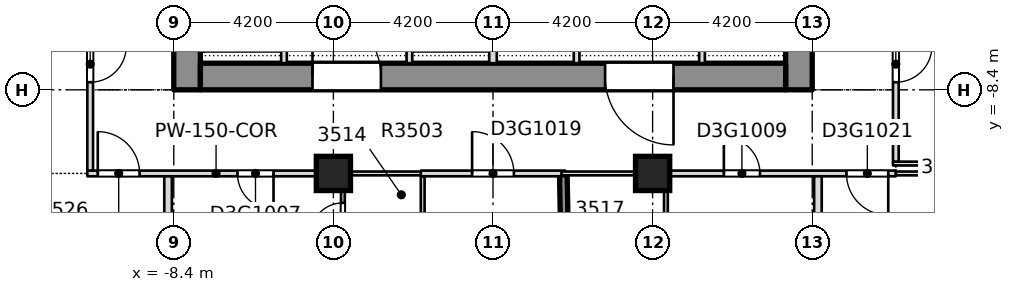
"""IFC4 building model, lengths in metres.
Left out: names, types, materials, properties, quantities, classifications, styles, units other than length and angle.
Written with IfcOpenShell. Run it as: python <this file> out.ifc"""

import sys

from ifc_helpers import new_model, si_unit, direction, frame, frame_2d, origin, origin_2d, place, context, subcontext, project, spatial, rectangle, extrude, element, fill, save


model = new_model("IFC4")
c1 = context("Model", 3, precision=1e-05, world=origin(), true_north=direction((0.0, 1.0)))
c2 = subcontext(c1, "Body", "Model", "MODEL_VIEW")
j1 = project(units=[si_unit("LENGTHUNIT", "METRE"), si_unit("PLANEANGLEUNIT", "RADIAN")], contexts=[c1])
p1 = place(None, origin())
s1 = spatial("IfcSite", under=j1, at=p1, CompositionType="ELEMENT")
p2 = place(p1, origin())
s2 = spatial("IfcBuilding", under=s1, at=p2, CompositionType="ELEMENT")
p3 = place(p2, frame((0.0, 0.0, 140.0)))
s3 = spatial("IfcBuildingStorey", under=s2, at=p3, CompositionType="ELEMENT", Elevation=140.0)
p4 = place(p3, frame((8.05, -8.4, -0.4), z_axis=(0.0, 0.0, 1.0), x_axis=(0.0, 1.0, 0.0)))
e1 = element("IfcWall", 1, at=p4, inside=s3, PredefinedType="SOLIDWALL", context=c2, shape_type="SweptSolid", body=[
    extrude(rectangle(XDim=30.15, YDim=0.7, at=frame_2d((15.075, 0.0))), origin(), (0.0, 0.0, 1.0), 3.45),
])
p5 = place(p4, frame((19.3, 0.0, 0.4)))
e2 = element("IfcOpeningElement", 2, at=p5, cuts=e1, PredefinedType="OPENING", context=c2, shape_type="SweptSolid", body=[
    extrude(rectangle(XDim=1.2, YDim=2.1, at=frame_2d((0.6, 1.05))), frame((0.0, 0.36, 0.0), z_axis=(0.0, -1.0, 0.0), x_axis=(1.0, 0.0, 0.0)), (0.0, 0.0, 1.0), 0.72),
])
p6 = place(p3, frame((-8.05, -8.4, -0.4), z_axis=(0.0, 0.0, 1.0), x_axis=(0.0, 1.0, 0.0)))
e3 = element("IfcWall", 3, at=p6, inside=s3, PredefinedType="SOLIDWALL", context=c2, shape_type="SweptSolid", body=[
    extrude(rectangle(XDim=30.15, YDim=0.7, at=frame_2d((15.075, 0.0))), origin(), (0.0, 0.0, 1.0), 3.45),
])
p7 = place(p6, frame((19.3, 0.0, 0.4)))
e4 = element("IfcOpeningElement", 4, at=p7, cuts=e3, PredefinedType="OPENING", context=c2, shape_type="SweptSolid", body=[
    extrude(rectangle(XDim=1.2, YDim=2.1, at=frame_2d((0.6, 1.05))), frame((0.0, 0.36, 0.0), z_axis=(0.0, -1.0, 0.0), x_axis=(1.0, 0.0, 0.0)), (0.0, 0.0, 1.0), 0.72),
])
p8 = place(p3, frame((-7.7, -8.05, -0.4), z_axis=(0.0, 0.0, 1.0), x_axis=(1.0, 0.0, 0.0)))
e5 = element("IfcWall", 5, at=p8, inside=s3, PredefinedType="SHEAR", context=c2, shape_type="SweptSolid", body=[
    extrude(rectangle(XDim=15.4, YDim=0.7, at=frame_2d((7.7, 0.0))), origin(), (0.0, 0.0, 1.0), 3.45),
])
p9 = place(p8, frame((2.95, 0.0, 0.4)))
e6 = element("IfcOpeningElement", 6, at=p9, cuts=e5, PredefinedType="OPENING", context=c2, shape_type="SweptSolid", body=[
    extrude(rectangle(XDim=1.8, YDim=2.1, at=frame_2d((0.9, 1.05))), frame((0.0, 0.36, 0.0), z_axis=(0.0, -1.0, 0.0), x_axis=(1.0, 0.0, 0.0)), (0.0, 0.0, 1.0), 0.72),
])
p10 = place(p8, frame((10.65, 0.0, 0.4)))
e7 = element("IfcOpeningElement", 7, at=p10, cuts=e5, PredefinedType="OPENING", context=c2, shape_type="SweptSolid", body=[
    extrude(rectangle(XDim=1.8, YDim=2.1, at=frame_2d((0.9, 1.05))), frame((0.0, 0.36, 0.0), z_axis=(0.0, -1.0, 0.0), x_axis=(1.0, 0.0, 0.0)), (0.0, 0.0, 1.0), 0.72),
])
for number, where, z_axis, x_axis in (
    (8, (-4.2, -10.6, -0.4), (0.0, 0.0, 1.0), (1.0, 0.0, 0.0)),
    (9, (4.2, -10.6, -0.4), (0.0, 0.0, 1.0), (1.0, 0.0, 0.0)),
):
    element("IfcColumn", number, at=place(p3, frame(where, z_axis=z_axis, x_axis=x_axis)), inside=s3, PredefinedType="COLUMN", context=c2, shape_type="SweptSolid", body=[
        extrude(rectangle(XDim=0.9, YDim=0.9, at=origin_2d()), origin(), (0.0, 0.0, 1.0), 3.45),
    ])
p11 = place(p3, frame((-10.675, -10.6, 0.0), z_axis=(0.0, 0.0, 1.0), x_axis=(1.0, 0.0, 0.0)))
e10 = element("IfcWall", 10, at=p11, inside=s3, PredefinedType="PARTITIONING", context=c2, shape_type="SweptSolid", body=[
    extrude(rectangle(XDim=6.775, YDim=0.15, at=frame_2d((3.388, 0.0))), origin(), (0.0, 0.0, 1.0), 3.05),
])
p12 = place(p11, frame((3.95, 0.0, 0.0)))
e11 = element("IfcOpeningElement", 11, at=p12, cuts=e10, PredefinedType="OPENING", context=c2, shape_type="SweptSolid", body=[
    extrude(rectangle(XDim=0.95, YDim=2.1, at=frame_2d((0.475, 1.05))), frame((0.0, 0.085, 0.0), z_axis=(0.0, -1.0, 0.0), x_axis=(1.0, 0.0, 0.0)), (0.0, 0.0, 1.0), 0.17),
])
p13 = place(p11, frame((0.275, 0.0, 0.0)))
e12 = element("IfcOpeningElement", 12, at=p13, cuts=e10, PredefinedType="OPENING", context=c2, shape_type="SweptSolid", body=[
    extrude(rectangle(XDim=1.1, YDim=2.1, at=frame_2d((0.55, 1.05))), frame((0.0, 0.085, 0.0), z_axis=(0.0, -1.0, 0.0), x_axis=(1.0, 0.0, 0.0)), (0.0, 0.0, 1.0), 0.17),
])
p14 = place(p3, frame((-4.0, -10.6, 0.0), z_axis=(0.0, 0.0, 1.0), x_axis=(1.0, 0.0, 0.0)))
e13 = element("IfcWall", 13, at=p14, inside=s3, PredefinedType="PARTITIONING", context=c2, shape_type="SweptSolid", body=[
    extrude(rectangle(XDim=2.2, YDim=0.1, at=frame_2d((1.1, 0.0))), origin(), (0.0, 0.0, 1.0), 3.05),
])
p15 = place(p3, frame((-1.9, -10.6, 0.0), z_axis=(0.0, 0.0, 1.0), x_axis=(1.0, 0.0, 0.0)))
e14 = element("IfcWall", 14, at=p15, inside=s3, PredefinedType="PARTITIONING", context=c2, shape_type="SweptSolid", body=[
    extrude(rectangle(XDim=3.8, YDim=0.15, at=frame_2d((1.9, 0.0))), origin(), (0.0, 0.0, 1.0), 3.05),
])
p16 = place(p15, frame((1.35, 0.0, 0.0)))
e15 = element("IfcOpeningElement", 15, at=p16, cuts=e14, PredefinedType="OPENING", context=c2, shape_type="SweptSolid", body=[
    extrude(rectangle(XDim=1.1, YDim=2.1, at=frame_2d((0.55, 1.05))), frame((0.0, 0.085, 0.0), z_axis=(0.0, -1.0, 0.0), x_axis=(1.0, 0.0, 0.0)), (0.0, 0.0, 1.0), 0.17),
])
p17 = place(p3, frame((1.8, -10.6, 0.0), z_axis=(0.0, 0.0, 1.0), x_axis=(1.0, 0.0, 0.0)))
e16 = element("IfcWall", 16, at=p17, inside=s3, PredefinedType="PARTITIONING", context=c2, shape_type="SweptSolid", body=[
    extrude(rectangle(XDim=2.8, YDim=0.1, at=frame_2d((1.4, 0.0))), origin(), (0.0, 0.0, 1.0), 3.05),
])
p18 = place(p3, frame((4.5, -10.6, 0.0), z_axis=(0.0, 0.0, 1.0), x_axis=(1.0, 0.0, 0.0)))
e17 = element("IfcWall", 17, at=p18, inside=s3, PredefinedType="PARTITIONING", context=c2, shape_type="SweptSolid", body=[
    extrude(rectangle(XDim=6.1, YDim=0.15, at=frame_2d((3.05, 0.0))), origin(), (0.0, 0.0, 1.0), 3.05),
])
p19 = place(p18, frame((1.575, 0.0, 0.0)))
e18 = element("IfcOpeningElement", 18, at=p19, cuts=e17, PredefinedType="OPENING", context=c2, shape_type="SweptSolid", body=[
    extrude(rectangle(XDim=0.95, YDim=2.1, at=frame_2d((0.475, 1.05))), frame((0.0, 0.085, 0.0), z_axis=(0.0, -1.0, 0.0), x_axis=(1.0, 0.0, 0.0)), (0.0, 0.0, 1.0), 0.17),
])
p20 = place(p18, frame((4.8, 0.0, 0.0)))
e19 = element("IfcOpeningElement", 19, at=p20, cuts=e17, PredefinedType="OPENING", context=c2, shape_type="SweptSolid", body=[
    extrude(rectangle(XDim=1.1, YDim=2.1, at=frame_2d((0.55, 1.05))), frame((0.0, 0.085, 0.0), z_axis=(0.0, -1.0, 0.0), x_axis=(1.0, 0.0, 0.0)), (0.0, 0.0, 1.0), 0.17),
])
p21 = place(p3, frame((10.6, -10.6, 0.0), z_axis=(0.0, 0.0, 1.0), x_axis=(1.0, 0.0, 0.0)))
e20 = element("IfcWall", 20, at=p21, inside=s3, PredefinedType="PARTITIONING", context=c2, shape_type="SweptSolid", body=[
    extrude(rectangle(XDim=1.7, YDim=0.1, at=frame_2d((0.85, 0.0))), origin(), (0.0, 0.0, 1.0), 3.05),
])
p22 = place(p3, frame((10.525, -10.34, 0.0), z_axis=(0.0, 0.0, 1.0), x_axis=(1.0, 0.0, 0.0)))
e21 = element("IfcWall", 21, at=p22, inside=s3, PredefinedType="PARTITIONING", context=c2, shape_type="SweptSolid", body=[
    extrude(rectangle(XDim=2.825, YDim=0.1, at=frame_2d((1.413, 0.0))), origin(), (0.0, 0.0, 1.0), 3.05),
])
p23 = place(p3, frame((-10.6, -10.525, 0.0), z_axis=(0.0, 0.0, 1.0), x_axis=(0.0, 1.0, 0.0)))
e22 = element("IfcWall", 22, at=p23, inside=s3, PredefinedType="PARTITIONING", context=c2, shape_type="SweptSolid", body=[
    extrude(rectangle(XDim=13.875, YDim=0.15, at=frame_2d((6.938, 0.0))), origin(), (0.0, 0.0, 1.0), 3.05),
])
p24 = place(p23, frame((2.325, 0.0, 0.0)))
e23 = element("IfcOpeningElement", 23, at=p24, cuts=e22, PredefinedType="OPENING", context=c2, shape_type="SweptSolid", body=[
    extrude(rectangle(XDim=0.95, YDim=2.1, at=frame_2d((0.475, 1.05))), frame((0.0, 0.085, 0.0), z_axis=(0.0, -1.0, 0.0), x_axis=(1.0, 0.0, 0.0)), (0.0, 0.0, 1.0), 0.17),
])
p25 = place(p23, frame((9.975, 0.0, 0.0)))
e24 = element("IfcOpeningElement", 24, at=p25, cuts=e22, PredefinedType="OPENING", context=c2, shape_type="SweptSolid", body=[
    extrude(rectangle(XDim=1.1, YDim=2.1, at=frame_2d((0.55, 1.05))), frame((0.0, 0.085, 0.0), z_axis=(0.0, -1.0, 0.0), x_axis=(1.0, 0.0, 0.0)), (0.0, 0.0, 1.0), 0.17),
])
p26 = place(p23, frame((4.825, 0.0, 0.0)))
e25 = element("IfcOpeningElement", 25, at=p26, cuts=e22, PredefinedType="OPENING", context=c2, shape_type="SweptSolid", body=[
    extrude(rectangle(XDim=1.0, YDim=2.1, at=frame_2d((0.5, 1.05))), frame((0.0, 0.085, 0.0), z_axis=(0.0, -1.0, 0.0), x_axis=(1.0, 0.0, 0.0)), (0.0, 0.0, 1.0), 0.17),
])
p27 = place(p23, frame((12.225, 0.0, 0.0)))
e26 = element("IfcOpeningElement", 26, at=p27, cuts=e22, PredefinedType="OPENING", context=c2, shape_type="SweptSolid", body=[
    extrude(rectangle(XDim=1.0, YDim=2.1, at=frame_2d((0.5, 1.05))), frame((0.0, 0.085, 0.0), z_axis=(0.0, -1.0, 0.0), x_axis=(1.0, 0.0, 0.0)), (0.0, 0.0, 1.0), 0.17),
])
p28 = place(p3, frame((-8.55, -13.1, 0.0), z_axis=(0.0, 0.0, 1.0), x_axis=(0.0, 1.0, 0.0)))
e27 = element("IfcWall", 27, at=p28, inside=s3, PredefinedType="PARTITIONING", context=c2, shape_type="SweptSolid", body=[
    extrude(rectangle(XDim=2.425, YDim=0.2, at=frame_2d((1.212, 0.0))), origin(), (0.0, 0.0, 1.0), 3.05),
])
p29 = place(p3, frame((-3.95, -12.95, 0.0), z_axis=(0.0, 0.0, 1.0), x_axis=(0.0, 1.0, 0.0)))
e28 = element("IfcWall", 28, at=p29, inside=s3, PredefinedType="PARTITIONING", context=c2, shape_type="SweptSolid", body=[
    extrude(rectangle(XDim=2.275, YDim=0.1, at=frame_2d((1.137, 0.0))), origin(), (0.0, 0.0, 1.0), 3.05),
])
p30 = place(p29, frame((0.725, 0.0, 0.0)))
e29 = element("IfcOpeningElement", 29, at=p30, cuts=e28, PredefinedType="OPENING", context=c2, shape_type="SweptSolid", body=[
    extrude(rectangle(XDim=0.85, YDim=2.1, at=frame_2d((0.425, 1.05))), frame((0.0, 0.06, 0.0), z_axis=(0.0, -1.0, 0.0), x_axis=(1.0, 0.0, 0.0)), (0.0, 0.0, 1.0), 0.12),
])
p31 = place(p3, frame((-1.85, -12.95, 0.0), z_axis=(0.0, 0.0, 1.0), x_axis=(0.0, 1.0, 0.0)))
e30 = element("IfcWall", 30, at=p31, inside=s3, PredefinedType="PARTITIONING", context=c2, shape_type="SweptSolid", body=[
    extrude(rectangle(XDim=2.275, YDim=0.1, at=frame_2d((1.137, 0.0))), origin(), (0.0, 0.0, 1.0), 3.05),
])
p32 = place(p3, frame((1.9, -13.248, 0.0), z_axis=(0.0, 0.0, 1.0), x_axis=(-0.019076944695, 0.999818018532, 0.0)))
e31 = element("IfcWall", 31, at=p32, inside=s3, PredefinedType="SOLIDWALL", context=c2, shape_type="SweptSolid", body=[
    extrude(rectangle(XDim=2.624, YDim=0.2, at=frame_2d((1.312, 0.0))), origin(), (0.0, 0.0, 1.0), 3.05),
])
p33 = place(p3, frame((4.55, -13.248, 0.0), z_axis=(0.0, 0.0, 1.0), x_axis=(0.0, 1.0, 0.0)))
e32 = element("IfcWall", 32, at=p33, inside=s3, PredefinedType="PARTITIONING", context=c2, shape_type="SweptSolid", body=[
    extrude(rectangle(XDim=2.573, YDim=0.1, at=frame_2d((1.287, 0.0))), origin(), (0.0, 0.0, 1.0), 3.05),
])
p34 = place(p3, frame((8.55, -13.1, 0.0), z_axis=(0.0, 0.0, 1.0), x_axis=(0.0, 1.0, 0.0)))
e33 = element("IfcWall", 33, at=p34, inside=s3, PredefinedType="PARTITIONING", context=c2, shape_type="SweptSolid", body=[
    extrude(rectangle(XDim=2.425, YDim=0.2, at=frame_2d((1.212, 0.0))), origin(), (0.0, 0.0, 1.0), 3.05),
])
p35 = place(p3, frame((10.6, -10.29, 0.0), z_axis=(0.0, 0.0, 1.0), x_axis=(0.0, 1.0, 0.0)))
e34 = element("IfcWall", 34, at=p35, inside=s3, PredefinedType="PARTITIONING", context=c2, shape_type="SweptSolid", body=[
    extrude(rectangle(XDim=13.64, YDim=0.15, at=frame_2d((6.82, 0.0))), origin(), (0.0, 0.0, 1.0), 3.05),
])
p36 = place(p35, frame((2.09, 0.0, 0.0)))
e35 = element("IfcOpeningElement", 35, at=p36, cuts=e34, PredefinedType="OPENING", context=c2, shape_type="SweptSolid", body=[
    extrude(rectangle(XDim=0.95, YDim=2.1, at=frame_2d((0.475, 1.05))), frame((0.0, 0.085, 0.0), z_axis=(0.0, -1.0, 0.0), x_axis=(1.0, 0.0, 0.0)), (0.0, 0.0, 1.0), 0.17),
])
p37 = place(p35, frame((9.74, 0.0, 0.0)))
e36 = element("IfcOpeningElement", 36, at=p37, cuts=e34, PredefinedType="OPENING", context=c2, shape_type="SweptSolid", body=[
    extrude(rectangle(XDim=1.1, YDim=2.1, at=frame_2d((0.55, 1.05))), frame((0.0, 0.085, 0.0), z_axis=(0.0, -1.0, 0.0), x_axis=(1.0, 0.0, 0.0)), (0.0, 0.0, 1.0), 0.17),
])
p38 = place(p35, frame((4.59, 0.0, 0.0)))
e37 = element("IfcOpeningElement", 37, at=p38, cuts=e34, PredefinedType="OPENING", context=c2, shape_type="SweptSolid", body=[
    extrude(rectangle(XDim=1.0, YDim=2.1, at=frame_2d((0.5, 1.05))), frame((0.0, 0.085, 0.0), z_axis=(0.0, -1.0, 0.0), x_axis=(1.0, 0.0, 0.0)), (0.0, 0.0, 1.0), 0.17),
])
p39 = place(p35, frame((11.99, 0.0, 0.0)))
e38 = element("IfcOpeningElement", 38, at=p39, cuts=e34, PredefinedType="OPENING", context=c2, shape_type="SweptSolid", body=[
    extrude(rectangle(XDim=1.0, YDim=2.1, at=frame_2d((0.5, 1.05))), frame((0.0, 0.085, 0.0), z_axis=(0.0, -1.0, 0.0), x_axis=(1.0, 0.0, 0.0)), (0.0, 0.0, 1.0), 0.17),
])
p40 = place(p3, frame((-5.5, -7.699, 0.0), z_axis=(0.0, 0.0, 1.0), x_axis=(0.0, 1.0, 0.0)))
e39 = element("IfcWall", 39, at=p40, inside=s3, PredefinedType="PARTITIONING", context=c2, shape_type="SweptSolid", body=[
    extrude(rectangle(XDim=12.124, YDim=0.15, at=frame_2d((6.062, 0.0))), origin(), (0.0, 0.0, 1.0), 3.05),
])
p41 = place(p40, frame((1.149, 0.0, 0.0)))
e40 = element("IfcOpeningElement", 40, at=p41, cuts=e39, PredefinedType="OPENING", context=c2, shape_type="SweptSolid", body=[
    extrude(rectangle(XDim=1.1, YDim=2.1, at=frame_2d((0.55, 1.05))), frame((0.0, 0.085, 0.0), z_axis=(0.0, -1.0, 0.0), x_axis=(1.0, 0.0, 0.0)), (0.0, 0.0, 1.0), 0.17),
])
p42 = place(p40, frame((4.149, 0.0, 0.0)))
e41 = element("IfcOpeningElement", 41, at=p42, cuts=e39, PredefinedType="OPENING", context=c2, shape_type="SweptSolid", body=[
    extrude(rectangle(XDim=1.1, YDim=2.1, at=frame_2d((0.55, 1.05))), frame((0.0, 0.085, 0.0), z_axis=(0.0, -1.0, 0.0), x_axis=(1.0, 0.0, 0.0)), (0.0, 0.0, 1.0), 0.17),
])
p43 = place(p40, frame((7.149, 0.0, 0.0)))
e42 = element("IfcOpeningElement", 42, at=p43, cuts=e39, PredefinedType="OPENING", context=c2, shape_type="SweptSolid", body=[
    extrude(rectangle(XDim=1.1, YDim=2.1, at=frame_2d((0.55, 1.05))), frame((0.0, 0.085, 0.0), z_axis=(0.0, -1.0, 0.0), x_axis=(1.0, 0.0, 0.0)), (0.0, 0.0, 1.0), 0.17),
])
p44 = place(p40, frame((10.149, 0.0, 0.0)))
e43 = element("IfcOpeningElement", 43, at=p44, cuts=e39, PredefinedType="OPENING", context=c2, shape_type="SweptSolid", body=[
    extrude(rectangle(XDim=1.1, YDim=2.1, at=frame_2d((0.55, 1.05))), frame((0.0, 0.085, 0.0), z_axis=(0.0, -1.0, 0.0), x_axis=(1.0, 0.0, 0.0)), (0.0, 0.0, 1.0), 0.17),
])
p45 = place(p3, frame((-2.2, -7.699, 0.0), z_axis=(0.0, 0.0, 1.0), x_axis=(0.0, 1.0, 0.0)))
e44 = element("IfcWall", 44, at=p45, inside=s3, PredefinedType="PARTITIONING", context=c2, shape_type="SweptSolid", body=[
    extrude(rectangle(XDim=12.124, YDim=0.15, at=frame_2d((6.062, 0.0))), origin(), (0.0, 0.0, 1.0), 3.05),
])
p46 = place(p45, frame((1.149, 0.0, 0.0)))
e45 = element("IfcOpeningElement", 45, at=p46, cuts=e44, PredefinedType="OPENING", context=c2, shape_type="SweptSolid", body=[
    extrude(rectangle(XDim=1.1, YDim=2.1, at=frame_2d((0.55, 1.05))), frame((0.0, 0.085, 0.0), z_axis=(0.0, -1.0, 0.0), x_axis=(1.0, 0.0, 0.0)), (0.0, 0.0, 1.0), 0.17),
])
p47 = place(p45, frame((5.724, 0.0, 0.0)))
e46 = element("IfcOpeningElement", 46, at=p47, cuts=e44, PredefinedType="OPENING", context=c2, shape_type="SweptSolid", body=[
    extrude(rectangle(XDim=0.95, YDim=2.1, at=frame_2d((0.475, 1.05))), frame((0.0, 0.085, 0.0), z_axis=(0.0, -1.0, 0.0), x_axis=(1.0, 0.0, 0.0)), (0.0, 0.0, 1.0), 0.17),
])
p48 = place(p45, frame((10.224, 0.0, 0.0)))
e47 = element("IfcOpeningElement", 47, at=p48, cuts=e44, PredefinedType="OPENING", context=c2, shape_type="SweptSolid", body=[
    extrude(rectangle(XDim=0.95, YDim=2.1, at=frame_2d((0.475, 1.05))), frame((0.0, 0.085, 0.0), z_axis=(0.0, -1.0, 0.0), x_axis=(1.0, 0.0, 0.0)), (0.0, 0.0, 1.0), 0.17),
])
p49 = place(p3, frame((0.0, -7.699, 0.0), z_axis=(0.0, 0.0, 1.0), x_axis=(0.0, 1.0, 0.0)))
e48 = element("IfcWall", 48, at=p49, inside=s3, PredefinedType="PARTITIONING", context=c2, shape_type="SweptSolid", body=[
    extrude(rectangle(XDim=12.124, YDim=0.2, at=frame_2d((6.062, 0.0))), origin(), (0.0, 0.0, 1.0), 3.05),
])
p50 = place(p3, frame((2.2, -7.699, 0.0), z_axis=(0.0, 0.0, 1.0), x_axis=(0.0, 1.0, 0.0)))
e49 = element("IfcWall", 49, at=p50, inside=s3, PredefinedType="PARTITIONING", context=c2, shape_type="SweptSolid", body=[
    extrude(rectangle(XDim=12.124, YDim=0.15, at=frame_2d((6.062, 0.0))), origin(), (0.0, 0.0, 1.0), 3.05),
])
p51 = place(p50, frame((2.724, 0.0, 0.0)))
e50 = element("IfcOpeningElement", 50, at=p51, cuts=e49, PredefinedType="OPENING", context=c2, shape_type="SweptSolid", body=[
    extrude(rectangle(XDim=0.95, YDim=2.1, at=frame_2d((0.475, 1.05))), frame((0.0, 0.085, 0.0), z_axis=(0.0, -1.0, 0.0), x_axis=(1.0, 0.0, 0.0)), (0.0, 0.0, 1.0), 0.17),
])
p52 = place(p50, frame((8.724, 0.0, 0.0)))
e51 = element("IfcOpeningElement", 51, at=p52, cuts=e49, PredefinedType="OPENING", context=c2, shape_type="SweptSolid", body=[
    extrude(rectangle(XDim=0.95, YDim=2.1, at=frame_2d((0.475, 1.05))), frame((0.0, 0.085, 0.0), z_axis=(0.0, -1.0, 0.0), x_axis=(1.0, 0.0, 0.0)), (0.0, 0.0, 1.0), 0.17),
])
p53 = place(p3, frame((5.5, -7.699, 0.0), z_axis=(0.0, 0.0, 1.0), x_axis=(0.0, 1.0, 0.0)))
e52 = element("IfcWall", 52, at=p53, inside=s3, PredefinedType="PARTITIONING", context=c2, shape_type="SweptSolid", body=[
    extrude(rectangle(XDim=12.124, YDim=0.15, at=frame_2d((6.062, 0.0))), origin(), (0.0, 0.0, 1.0), 3.05),
])
p54 = place(p53, frame((2.724, 0.0, 0.0)))
e53 = element("IfcOpeningElement", 53, at=p54, cuts=e52, PredefinedType="OPENING", context=c2, shape_type="SweptSolid", body=[
    extrude(rectangle(XDim=0.95, YDim=2.1, at=frame_2d((0.475, 1.05))), frame((0.0, 0.085, 0.0), z_axis=(0.0, -1.0, 0.0), x_axis=(1.0, 0.0, 0.0)), (0.0, 0.0, 1.0), 0.17),
])
p55 = place(p53, frame((8.724, 0.0, 0.0)))
e54 = element("IfcOpeningElement", 54, at=p55, cuts=e52, PredefinedType="OPENING", context=c2, shape_type="SweptSolid", body=[
    extrude(rectangle(XDim=0.95, YDim=2.1, at=frame_2d((0.475, 1.05))), frame((0.0, 0.085, 0.0), z_axis=(0.0, -1.0, 0.0), x_axis=(1.0, 0.0, 0.0)), (0.0, 0.0, 1.0), 0.17),
])
p56 = place(p24, origin())
e55 = element("IfcDoor", 55, at=p56, inside=s3, OperationType="SINGLE_SWING_RIGHT", PredefinedType="DOOR", context=c2, shape_type="SweptSolid", body=[
    extrude(rectangle(XDim=0.95, YDim=2.1, at=frame_2d((0.475, 1.05))), frame((0.0, 0.025, 0.0), z_axis=(0.0, -1.0, 0.0), x_axis=(1.0, 0.0, 0.0)), (0.0, 0.0, 1.0), 0.05),
])
fill(e23, e55)
p57 = place(p12, origin())
e56 = element("IfcDoor", 56, at=p57, inside=s3, OperationType="SINGLE_SWING_RIGHT", PredefinedType="DOOR", context=c2, shape_type="SweptSolid", body=[
    extrude(rectangle(XDim=0.95, YDim=2.1, at=frame_2d((0.475, 1.05))), frame((0.0, 0.025, 0.0), z_axis=(0.0, -1.0, 0.0), x_axis=(1.0, 0.0, 0.0)), (0.0, 0.0, 1.0), 0.05),
])
fill(e11, e56)
p58 = place(p30, origin())
e57 = element("IfcDoor", 57, at=p58, inside=s3, OperationType="SINGLE_SWING_RIGHT", PredefinedType="DOOR", context=c2, shape_type="SweptSolid", body=[
    extrude(rectangle(XDim=0.85, YDim=2.1, at=frame_2d((0.425, 1.05))), frame((0.0, 0.025, 0.0), z_axis=(0.0, -1.0, 0.0), x_axis=(1.0, 0.0, 0.0)), (0.0, 0.0, 1.0), 0.05),
])
fill(e29, e57)
p59 = place(p19, origin())
e58 = element("IfcDoor", 58, at=p59, inside=s3, OperationType="SINGLE_SWING_LEFT", PredefinedType="DOOR", context=c2, shape_type="SweptSolid", body=[
    extrude(rectangle(XDim=0.95, YDim=2.1, at=frame_2d((0.475, 1.05))), frame((0.0, 0.025, 0.0), z_axis=(0.0, -1.0, 0.0), x_axis=(1.0, 0.0, 0.0)), (0.0, 0.0, 1.0), 0.05),
])
fill(e18, e58)
p60 = place(p36, origin())
e59 = element("IfcDoor", 59, at=p60, inside=s3, OperationType="SINGLE_SWING_LEFT", PredefinedType="DOOR", context=c2, shape_type="SweptSolid", body=[
    extrude(rectangle(XDim=0.95, YDim=2.1, at=frame_2d((0.475, 1.05))), frame((0.0, 0.025, 0.0), z_axis=(0.0, -1.0, 0.0), x_axis=(1.0, 0.0, 0.0)), (0.0, 0.0, 1.0), 0.05),
])
fill(e35, e59)
p61 = place(p13, origin())
e60 = element("IfcDoor", 60, at=p61, inside=s3, OperationType="SINGLE_SWING_RIGHT", PredefinedType="DOOR", context=c2, shape_type="SweptSolid", body=[
    extrude(rectangle(XDim=1.1, YDim=2.1, at=frame_2d((0.55, 1.05))), frame((0.0, 0.025, 0.0), z_axis=(0.0, -1.0, 0.0), x_axis=(1.0, 0.0, 0.0)), (0.0, 0.0, 1.0), 0.05),
])
fill(e12, e60)
p62 = place(p16, origin())
e61 = element("IfcDoor", 61, at=p62, inside=s3, OperationType="SINGLE_SWING_RIGHT", PredefinedType="DOOR", context=c2, shape_type="SweptSolid", body=[
    extrude(rectangle(XDim=1.1, YDim=2.1, at=frame_2d((0.55, 1.05))), frame((0.0, 0.025, 0.0), z_axis=(0.0, -1.0, 0.0), x_axis=(1.0, 0.0, 0.0)), (0.0, 0.0, 1.0), 0.05),
])
fill(e15, e61)
p63 = place(p20, origin())
e62 = element("IfcDoor", 62, at=p63, inside=s3, OperationType="SINGLE_SWING_RIGHT", PredefinedType="DOOR", context=c2, shape_type="SweptSolid", body=[
    extrude(rectangle(XDim=1.1, YDim=2.1, at=frame_2d((0.55, 1.05))), frame((0.0, 0.025, 0.0), z_axis=(0.0, -1.0, 0.0), x_axis=(1.0, 0.0, 0.0)), (0.0, 0.0, 1.0), 0.05),
])
fill(e19, e62)
p64 = place(p9, origin())
e63 = element("IfcDoor", 63, at=p64, inside=s3, OperationType="SINGLE_SWING_LEFT", PredefinedType="DOOR", context=c2, shape_type="SweptSolid", body=[
    extrude(rectangle(XDim=1.8, YDim=2.1, at=frame_2d((0.9, 1.05))), frame((0.0, 0.025, 0.0), z_axis=(0.0, -1.0, 0.0), x_axis=(1.0, 0.0, 0.0)), (0.0, 0.0, 1.0), 0.05),
])
fill(e6, e63)
p65 = place(p10, origin())
e64 = element("IfcDoor", 64, at=p65, inside=s3, OperationType="SINGLE_SWING_LEFT", PredefinedType="DOOR", context=c2, shape_type="SweptSolid", body=[
    extrude(rectangle(XDim=1.8, YDim=2.1, at=frame_2d((0.9, 1.05))), frame((0.0, 0.025, 0.0), z_axis=(0.0, -1.0, 0.0), x_axis=(1.0, 0.0, 0.0)), (0.0, 0.0, 1.0), 0.05),
])
fill(e7, e64)
save(model, sys.argv[1])
